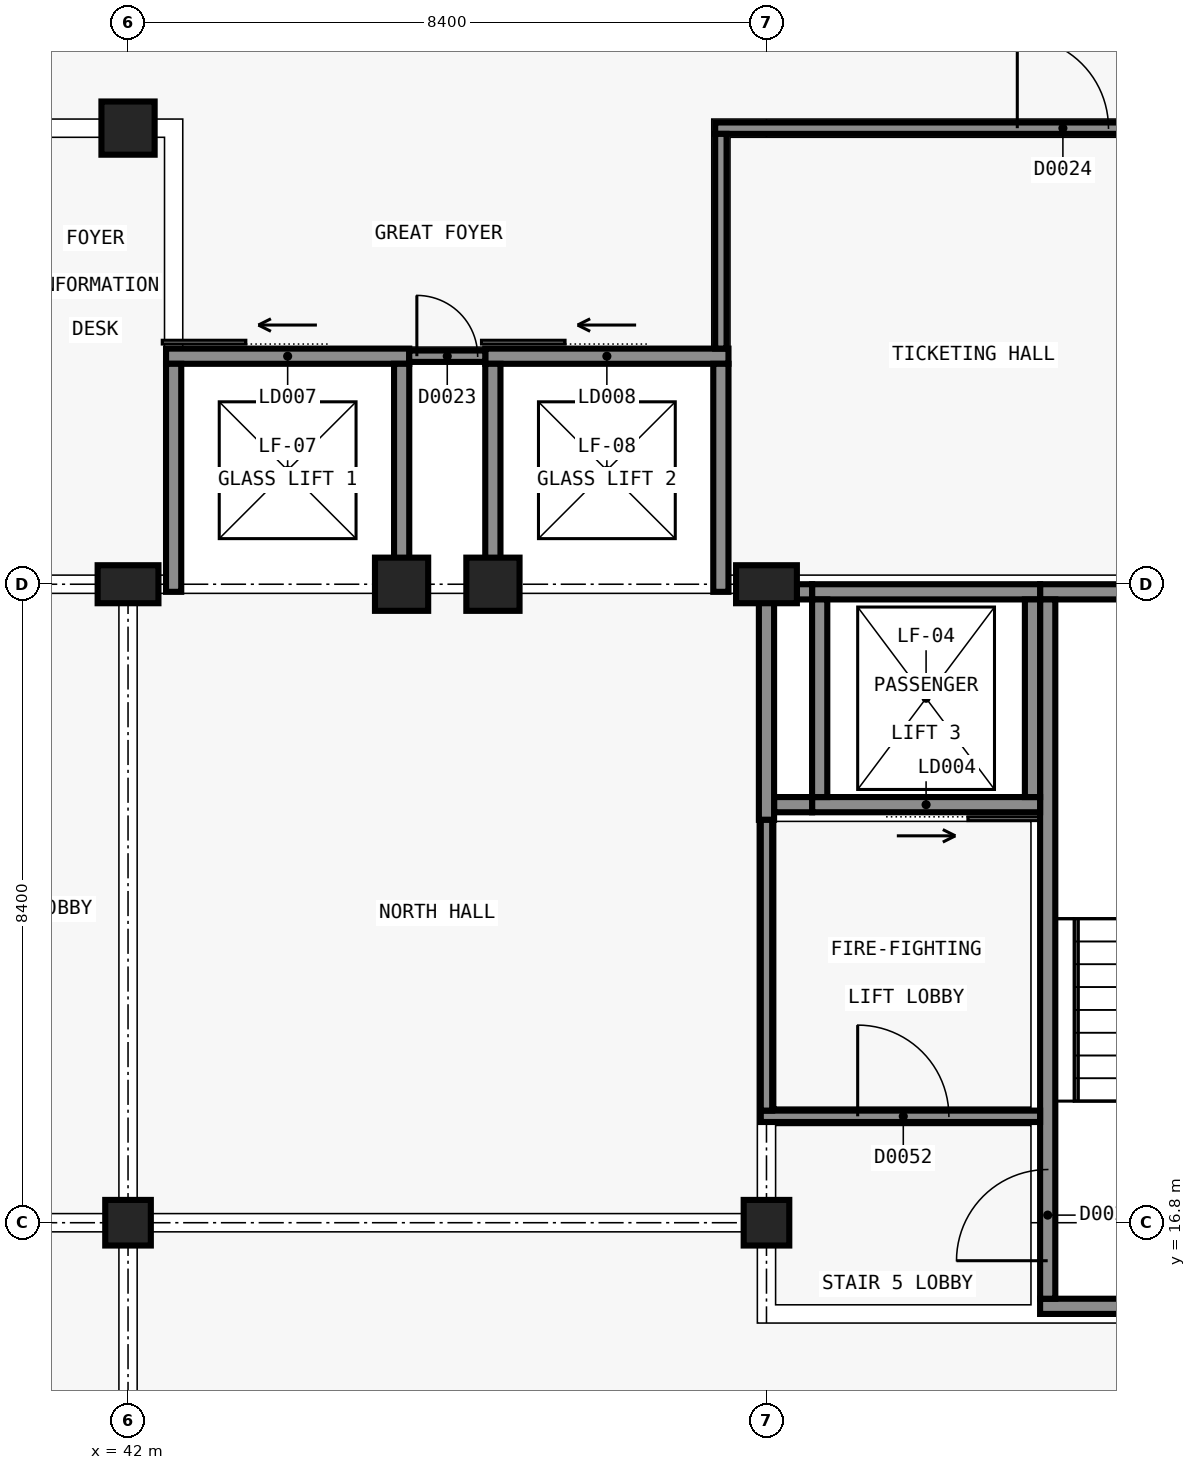
"""IFC4 building model, lengths in metres.
Left out: names, types, materials, properties, quantities, classifications, styles, units other than length and angle.
Written with IfcOpenShell. Run it as: python <this file> out.ifc"""

import sys

from ifc_helpers import new_model, si_unit, direction, frame, frame_2d, origin, origin_2d, place, context, subcontext, project, spatial, rectangle, extrude, element, fill, save


model = new_model("IFC4")
c1 = context("Model", 3, precision=1e-05, world=origin(), true_north=direction((0.0, 1.0)))
c2 = subcontext(c1, "Body", "Model", "MODEL_VIEW")
j1 = project(units=[si_unit("LENGTHUNIT", "METRE"), si_unit("PLANEANGLEUNIT", "RADIAN")], contexts=[c1])
p1 = place(None, origin())
s1 = spatial("IfcSite", under=j1, at=p1, CompositionType="ELEMENT")
p2 = place(p1, origin())
s2 = spatial("IfcBuilding", under=s1, at=p2, CompositionType="ELEMENT")
p3 = place(p2, origin())
s3 = spatial("IfcBuildingStorey", under=s2, at=p3, CompositionType="ELEMENT", Elevation=0.0)
p4 = place(p3, frame((58.8, 15.7, -0.3), z_axis=(0.0, 0.0, 1.0), x_axis=(-1.0, 0.0, 0.0)))
e1 = element("IfcWall", 1, at=p4, inside=s3, PredefinedType="SHEAR", context=c2, shape_type="SweptSolid", body=[
    extrude(rectangle(XDim=4.8, YDim=0.2, at=frame_2d((2.4, 0.0))), origin(), (0.0, 0.0, 1.0), 5.7),
])
p5 = place(p4, frame((1.8, 0.0, 0.3)))
e2 = element("IfcOpeningElement", 2, at=p5, cuts=e1, PredefinedType="OPENING", context=c2, shape_type="SweptSolid", body=[
    extrude(rectangle(XDim=1.2, YDim=2.1, at=frame_2d((0.6, 1.05))), frame((0.0, 0.11, 0.0), z_axis=(0.0, -1.0, 0.0), x_axis=(1.0, 0.0, 0.0)), (0.0, 0.0, 1.0), 0.22),
])
p6 = place(p3, frame((54.0, 25.1, -0.3), z_axis=(0.0, 0.0, 1.0), x_axis=(1.0, 0.0, 0.0)))
e3 = element("IfcWall", 3, at=p6, inside=s3, PredefinedType="SHEAR", context=c2, shape_type="SweptSolid", body=[
    extrude(rectangle(XDim=4.8, YDim=0.2, at=frame_2d((2.4, 0.0))), origin(), (0.0, 0.0, 1.0), 5.7),
])
p7 = place(p3, frame((54.1, 15.8, -0.3), z_axis=(0.0, 0.0, 1.0), x_axis=(0.0, 1.0, 0.0)))
e4 = element("IfcWall", 4, at=p7, inside=s3, PredefinedType="SHEAR", context=c2, shape_type="SweptSolid", body=[
    extrude(rectangle(XDim=9.2, YDim=0.2, at=frame_2d((4.6, 0.0))), origin(), (0.0, 0.0, 1.0), 5.7),
])
p8 = place(p7, frame((0.5, 0.0, 0.3)))
e5 = element("IfcOpeningElement", 5, at=p8, cuts=e4, PredefinedType="OPENING", context=c2, shape_type="SweptSolid", body=[
    extrude(rectangle(XDim=1.2, YDim=2.1, at=frame_2d((0.6, 1.05))), frame((0.0, 0.11, 0.0), z_axis=(0.0, -1.0, 0.0), x_axis=(1.0, 0.0, 0.0)), (0.0, 0.0, 1.0), 0.22),
])
p9 = place(p3, frame((54.0, 22.3, -1.6), z_axis=(0.0, 0.0, 1.0), x_axis=(-1.0, 0.0, 0.0)))
e6 = element("IfcWall", 6, at=p9, inside=s3, PredefinedType="SHEAR", context=c2, shape_type="SweptSolid", body=[
    extrude(rectangle(XDim=3.0, YDim=0.2, at=frame_2d((1.5, 0.0))), origin(), (0.0, 0.0, 1.0), 7.0),
])
p10 = place(p9, frame((0.95, 0.0, 1.6)))
e7 = element("IfcOpeningElement", 7, at=p10, cuts=e6, PredefinedType="OPENING", context=c2, shape_type="SweptSolid", body=[
    extrude(rectangle(XDim=1.1, YDim=2.1, at=frame_2d((0.55, 1.05))), frame((0.0, 0.11, 0.0), z_axis=(0.0, -1.0, 0.0), x_axis=(1.0, 0.0, 0.0)), (0.0, 0.0, 1.0), 0.22),
])
p11 = place(p3, frame((51.0, 25.1, -1.6), z_axis=(0.0, 0.0, 1.0), x_axis=(1.0, 0.0, 0.0)))
e8 = element("IfcWall", 8, at=p11, inside=s3, PredefinedType="SHEAR", context=c2, shape_type="SweptSolid", body=[
    extrude(rectangle(XDim=3.0, YDim=0.2, at=frame_2d((1.5, 0.0))), origin(), (0.0, 0.0, 1.0), 7.0),
])
for number, where, z_axis, x_axis in (
    (9, (51.1, 22.4, -1.6), (0.0, 0.0, 1.0), (0.0, 1.0, 0.0)),
    (10, (53.9, 25.0, -1.6), (0.0, 0.0, 1.0), (0.0, -1.0, 0.0)),
):
    element("IfcWall", number, at=place(p3, frame(where, z_axis=z_axis, x_axis=x_axis)), inside=s3, PredefinedType="SHEAR", context=c2, shape_type="SweptSolid", body=[
        extrude(rectangle(XDim=2.6, YDim=0.2, at=frame_2d((1.3, 0.0))), origin(), (0.0, 0.0, 1.0), 7.0),
    ])
p12 = place(p3, frame((42.0, 16.8, -0.3), z_axis=(0.0, 0.0, 1.0), x_axis=(1.0, 0.0, 0.0)))
e11 = element("IfcColumn", 11, at=p12, inside=s3, PredefinedType="COLUMN", context=c2, shape_type="SweptSolid", body=[
    extrude(rectangle(XDim=0.6, YDim=0.6, at=origin_2d()), origin(), (0.0, 0.0, 1.0), 5.7),
])
p13 = place(p3, frame((42.0, 25.2, -0.3), z_axis=(0.0, 0.0, 1.0), x_axis=(1.0, 0.0, 0.0)))
e12 = element("IfcColumn", 12, at=p13, inside=s3, PredefinedType="COLUMN", context=c2, shape_type="SweptSolid", body=[
    extrude(rectangle(XDim=0.8, YDim=0.5, at=origin_2d()), origin(), (0.0, 0.0, 1.0), 5.7),
])
p14 = place(p3, frame((50.4, 16.8, -0.3), z_axis=(0.0, 0.0, 1.0), x_axis=(1.0, 0.0, 0.0)))
e13 = element("IfcColumn", 13, at=p14, inside=s3, PredefinedType="COLUMN", context=c2, shape_type="SweptSolid", body=[
    extrude(rectangle(XDim=0.6, YDim=0.6, at=origin_2d()), origin(), (0.0, 0.0, 1.0), 5.7),
])
p15 = place(p3, frame((50.4, 25.2, -0.3), z_axis=(0.0, 0.0, 1.0), x_axis=(1.0, 0.0, 0.0)))
e14 = element("IfcColumn", 14, at=p15, inside=s3, PredefinedType="COLUMN", context=c2, shape_type="SweptSolid", body=[
    extrude(rectangle(XDim=0.8, YDim=0.5, at=origin_2d()), origin(), (0.0, 0.0, 1.0), 5.7),
])
p16 = place(p3, frame((51.0, 22.3, -0.3), z_axis=(0.0, 0.0, 1.0), x_axis=(-1.0, 0.0, 0.0)))
e15 = element("IfcWall", 15, at=p16, inside=s3, PredefinedType="SHEAR", context=c2, shape_type="SweptSolid", body=[
    extrude(rectangle(XDim=0.5, YDim=0.2, at=frame_2d((0.25, 0.0))), origin(), (0.0, 0.0, 1.0), 5.7),
])
p17 = place(p3, frame((50.8, 25.1, -0.3), z_axis=(0.0, 0.0, 1.0), x_axis=(1.0, 0.0, 0.0)))
e16 = element("IfcWall", 16, at=p17, inside=s3, PredefinedType="SHEAR", context=c2, shape_type="SweptSolid", body=[
    extrude(rectangle(XDim=0.2, YDim=0.2, at=frame_2d((0.1, 0.0))), origin(), (0.0, 0.0, 1.0), 5.7),
])
for number, where, z_axis, x_axis in (
    (17, (42.0, 31.201, -0.3), (0.0, 0.0, 1.0), (1.0, 0.0, 0.0)),
    (18, (45.599, 25.2, -0.3), (0.0, 0.0, 1.0), (1.0, 0.0, 0.0)),
    (19, (46.801, 25.2, -0.3), (0.0, 0.0, 1.0), (1.0, 0.0, 0.0)),
):
    element("IfcColumn", number, at=place(p3, frame(where, z_axis=z_axis, x_axis=x_axis)), inside=s3, PredefinedType="COLUMN", context=c2, shape_type="SweptSolid", body=[
        extrude(rectangle(XDim=0.7, YDim=0.7, at=origin_2d()), origin(), (0.0, 0.0, 1.0), 5.7),
    ])
p18 = place(p3, frame((42.5, 28.2, 0.0), z_axis=(0.0, 0.0, 1.0), x_axis=(1.0, 0.0, 0.0)))
e20 = element("IfcWall", 20, at=p18, inside=s3, PredefinedType="SHEAR", context=c2, shape_type="SweptSolid", body=[
    extrude(rectangle(XDim=3.2, YDim=0.2, at=frame_2d((1.6, 0.0))), origin(), (0.0, 0.0, 1.0), 5.1),
])
p19 = place(p18, frame((1.05, 0.0, 0.0)))
e21 = element("IfcOpeningElement", 21, at=p19, cuts=e20, PredefinedType="OPENING", context=c2, shape_type="SweptSolid", body=[
    extrude(rectangle(XDim=1.1, YDim=2.1, at=frame_2d((0.55, 1.05))), frame((0.0, 0.11, 0.0), z_axis=(0.0, -1.0, 0.0), x_axis=(1.0, 0.0, 0.0)), (0.0, 0.0, 1.0), 0.22),
])
p20 = place(p3, frame((46.7, 28.2, 0.0), z_axis=(0.0, 0.0, 1.0), x_axis=(1.0, 0.0, 0.0)))
e22 = element("IfcWall", 22, at=p20, inside=s3, PredefinedType="SHEAR", context=c2, shape_type="SweptSolid", body=[
    extrude(rectangle(XDim=3.2, YDim=0.2, at=frame_2d((1.6, 0.0))), origin(), (0.0, 0.0, 1.0), 5.1),
])
p21 = place(p20, frame((1.05, 0.0, 0.0)))
e23 = element("IfcOpeningElement", 23, at=p21, cuts=e22, PredefinedType="OPENING", context=c2, shape_type="SweptSolid", body=[
    extrude(rectangle(XDim=1.1, YDim=2.1, at=frame_2d((0.55, 1.05))), frame((0.0, 0.11, 0.0), z_axis=(0.0, -1.0, 0.0), x_axis=(1.0, 0.0, 0.0)), (0.0, 0.0, 1.0), 0.22),
])
for number, where, z_axis, x_axis in (
    (24, (42.6, 25.1, 0.0), (0.0, 0.0, 1.0), (0.0, 1.0, 0.0)),
    (25, (45.6, 25.1, 0.0), (0.0, 0.0, 1.0), (0.0, 1.0, 0.0)),
    (26, (46.8, 25.1, 0.0), (0.0, 0.0, 1.0), (0.0, 1.0, 0.0)),
    (27, (49.8, 25.1, 0.0), (0.0, 0.0, 1.0), (0.0, 1.0, 0.0)),
):
    element("IfcWall", number, at=place(p3, frame(where, z_axis=z_axis, x_axis=x_axis)), inside=s3, PredefinedType="SHEAR", context=c2, shape_type="SweptSolid", body=[
        extrude(rectangle(XDim=3.0, YDim=0.2, at=frame_2d((1.5, 0.0))), origin(), (0.0, 0.0, 1.0), 5.1),
    ])
p22 = place(p3, frame((50.4, 22.1, 0.0), z_axis=(0.0, 0.0, 1.0), x_axis=(0.0, 1.0, 0.0)))
e28 = element("IfcWall", 28, at=p22, inside=s3, PredefinedType="SHEAR", context=c2, shape_type="SweptSolid", body=[
    extrude(rectangle(XDim=3.2, YDim=0.2, at=frame_2d((1.6, 0.0))), origin(), (0.0, 0.0, 1.0), 5.1),
])
p23 = place(p3, frame((49.725, 31.2, 0.0), z_axis=(0.0, 0.0, 1.0), x_axis=(1.0, 0.0, 0.0)))
e29 = element("IfcWall", 29, at=p23, inside=s3, PredefinedType="PARTITIONING", context=c2, shape_type="SweptSolid", body=[
    extrude(rectangle(XDim=9.075, YDim=0.15, at=frame_2d((4.538, 0.0))), origin(), (0.0, 0.0, 1.0), 4.4),
])
p24 = place(p23, frame((3.975, 0.0, 0.0)))
e30 = element("IfcOpeningElement", 30, at=p24, cuts=e29, PredefinedType="OPENING", context=c2, shape_type="SweptSolid", body=[
    extrude(rectangle(XDim=1.2, YDim=2.1, at=frame_2d((0.6, 1.05))), frame((0.0, 0.085, 0.0), z_axis=(0.0, -1.0, 0.0), x_axis=(1.0, 0.0, 0.0)), (0.0, 0.0, 1.0), 0.17),
])
p25 = place(p3, frame((50.325, 18.2, 0.0), z_axis=(0.0, 0.0, 1.0), x_axis=(1.0, 0.0, 0.0)))
e31 = element("IfcWall", 31, at=p25, inside=s3, PredefinedType="SOLIDWALL", context=c2, shape_type="SweptSolid", body=[
    extrude(rectangle(XDim=3.675, YDim=0.15, at=frame_2d((1.837, 0.0))), origin(), (0.0, 0.0, 1.0), 4.4),
])
p26 = place(p25, frame((1.275, 0.0, 0.0)))
e32 = element("IfcOpeningElement", 32, at=p26, cuts=e31, PredefinedType="OPENING", context=c2, shape_type="SweptSolid", body=[
    extrude(rectangle(XDim=1.2, YDim=2.1, at=frame_2d((0.6, 1.05))), frame((0.0, 0.085, 0.0), z_axis=(0.0, -1.0, 0.0), x_axis=(1.0, 0.0, 0.0)), (0.0, 0.0, 1.0), 0.17),
])
p27 = place(p3, frame((45.7, 28.2, 0.0), z_axis=(0.0, 0.0, 1.0), x_axis=(1.0, 0.0, 0.0)))
e33 = element("IfcWall", 33, at=p27, inside=s3, PredefinedType="SOLIDWALL", context=c2, shape_type="SweptSolid", body=[
    extrude(rectangle(XDim=1.0, YDim=0.15, at=frame_2d((0.5, 0.0))), origin(), (0.0, 0.0, 1.0), 5.1),
])
p28 = place(p27, frame((0.1, 0.0, 0.0)))
e34 = element("IfcOpeningElement", 34, at=p28, cuts=e33, PredefinedType="OPENING", context=c2, shape_type="SweptSolid", body=[
    extrude(rectangle(XDim=0.8, YDim=2.1, at=frame_2d((0.4, 1.05))), frame((0.0, 0.085, 0.0), z_axis=(0.0, -1.0, 0.0), x_axis=(1.0, 0.0, 0.0)), (0.0, 0.0, 1.0), 0.17),
])
p29 = place(p3, frame((49.8, 28.3, 0.0), z_axis=(0.0, 0.0, 1.0), x_axis=(0.0, 1.0, 0.0)))
e35 = element("IfcWall", 35, at=p29, inside=s3, PredefinedType="PARTITIONING", context=c2, shape_type="SweptSolid", body=[
    extrude(rectangle(XDim=2.825, YDim=0.15, at=frame_2d((1.413, 0.0))), origin(), (0.0, 0.0, 1.0), 4.4),
])
p30 = place(p3, frame((50.4, 18.275, 0.0), z_axis=(0.0, 0.0, 1.0), x_axis=(0.0, 1.0, 0.0)))
e36 = element("IfcWall", 36, at=p30, inside=s3, PredefinedType="SOLIDWALL", context=c2, shape_type="SweptSolid", body=[
    extrude(rectangle(XDim=3.825, YDim=0.15, at=frame_2d((1.913, 0.0))), origin(), (0.0, 0.0, 1.0), 4.4),
])
p31 = place(p10, origin())
e37 = element("IfcDoor", 37, at=p31, inside=s3, OperationType="SLIDING_TO_LEFT", PredefinedType="DOOR", context=c2, shape_type="SweptSolid", body=[
    extrude(rectangle(XDim=1.1, YDim=2.1, at=frame_2d((0.55, 1.05))), frame((0.0, 0.025, 0.0), z_axis=(0.0, -1.0, 0.0), x_axis=(1.0, 0.0, 0.0)), (0.0, 0.0, 1.0), 0.05),
])
fill(e7, e37)
p32 = place(p19, origin())
e38 = element("IfcDoor", 38, at=p32, inside=s3, OperationType="SLIDING_TO_LEFT", PredefinedType="DOOR", context=c2, shape_type="SweptSolid", body=[
    extrude(rectangle(XDim=1.1, YDim=2.1, at=frame_2d((0.55, 1.05))), frame((0.0, 0.025, 0.0), z_axis=(0.0, -1.0, 0.0), x_axis=(1.0, 0.0, 0.0)), (0.0, 0.0, 1.0), 0.05),
])
fill(e21, e38)
p33 = place(p21, origin())
e39 = element("IfcDoor", 39, at=p33, inside=s3, OperationType="SLIDING_TO_LEFT", PredefinedType="DOOR", context=c2, shape_type="SweptSolid", body=[
    extrude(rectangle(XDim=1.1, YDim=2.1, at=frame_2d((0.55, 1.05))), frame((0.0, 0.025, 0.0), z_axis=(0.0, -1.0, 0.0), x_axis=(1.0, 0.0, 0.0)), (0.0, 0.0, 1.0), 0.05),
])
fill(e23, e39)
p34 = place(p8, origin())
e40 = element("IfcDoor", 40, at=p34, inside=s3, OperationType="SINGLE_SWING_LEFT", PredefinedType="DOOR", context=c2, shape_type="SweptSolid", body=[
    extrude(rectangle(XDim=1.2, YDim=2.1, at=frame_2d((0.6, 1.05))), frame((0.0, 0.025, 0.0), z_axis=(0.0, -1.0, 0.0), x_axis=(1.0, 0.0, 0.0)), (0.0, 0.0, 1.0), 0.05),
])
fill(e5, e40)
p35 = place(p28, origin())
e41 = element("IfcDoor", 41, at=p35, inside=s3, OperationType="SINGLE_SWING_RIGHT", PredefinedType="DOOR", context=c2, shape_type="SweptSolid", body=[
    extrude(rectangle(XDim=0.8, YDim=2.1, at=frame_2d((0.4, 1.05))), frame((0.0, 0.025, 0.0), z_axis=(0.0, -1.0, 0.0), x_axis=(1.0, 0.0, 0.0)), (0.0, 0.0, 1.0), 0.05),
])
fill(e34, e41)
p36 = place(p24, origin())
e42 = element("IfcDoor", 42, at=p36, inside=s3, OperationType="SINGLE_SWING_RIGHT", PredefinedType="DOOR", context=c2, shape_type="SweptSolid", body=[
    extrude(rectangle(XDim=1.2, YDim=2.1, at=frame_2d((0.6, 1.05))), frame((0.0, 0.025, 0.0), z_axis=(0.0, -1.0, 0.0), x_axis=(1.0, 0.0, 0.0)), (0.0, 0.0, 1.0), 0.05),
])
fill(e30, e42)
p37 = place(p26, origin())
e43 = element("IfcDoor", 43, at=p37, inside=s3, OperationType="SINGLE_SWING_RIGHT", PredefinedType="DOOR", context=c2, shape_type="SweptSolid", body=[
    extrude(rectangle(XDim=1.2, YDim=2.1, at=frame_2d((0.6, 1.05))), frame((0.0, 0.025, 0.0), z_axis=(0.0, -1.0, 0.0), x_axis=(1.0, 0.0, 0.0)), (0.0, 0.0, 1.0), 0.05),
])
fill(e32, e43)
save(model, sys.argv[1])
